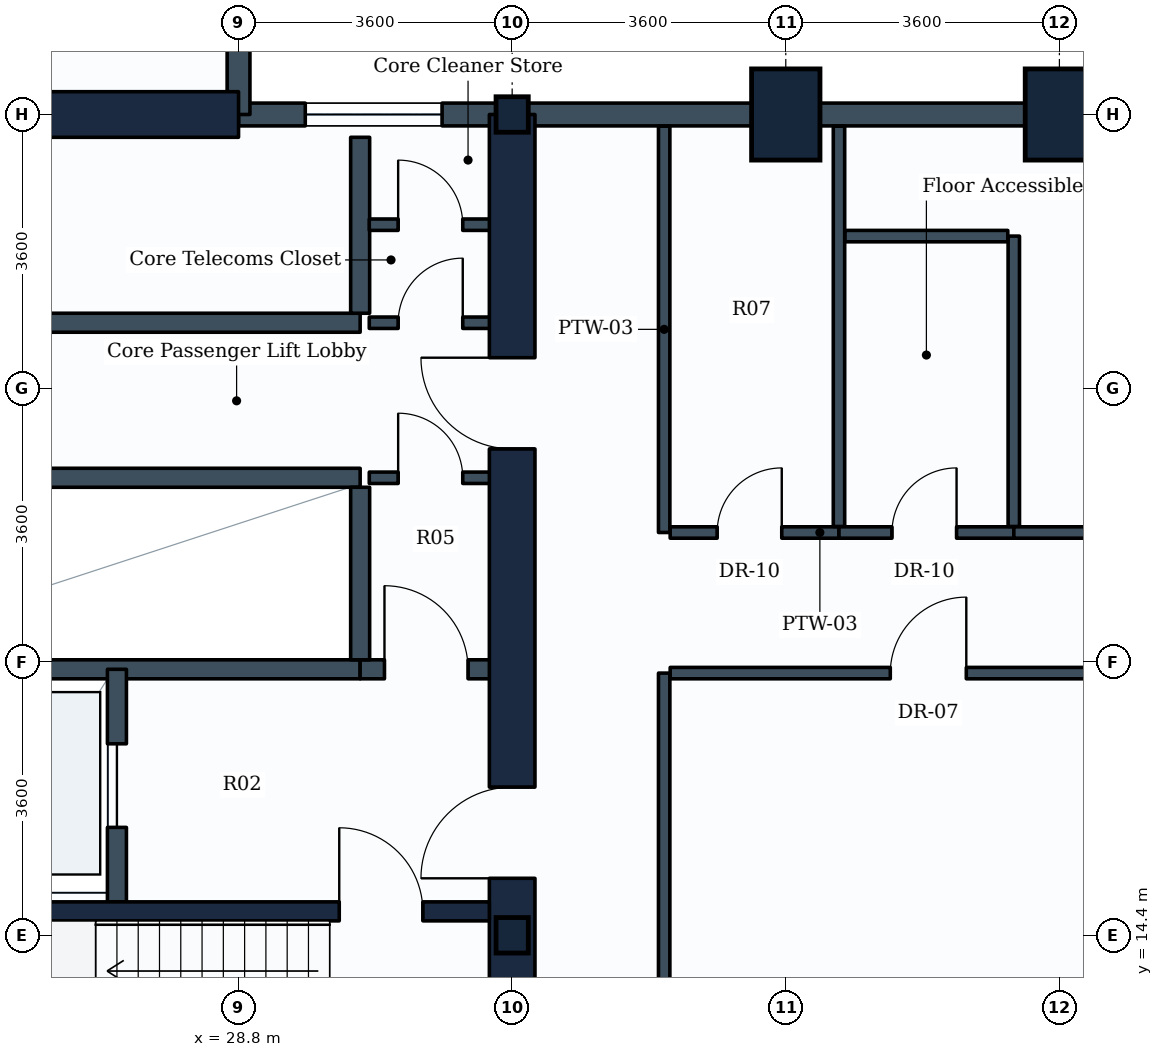
"""IFC4 building model, lengths in metres.
Left out: names, types, materials, properties, quantities, classifications, styles, units other than length and angle.
Written with IfcOpenShell. Run it as: python <this file> out.ifc"""

import sys

from ifc_helpers import new_model, si_unit, direction, frame, frame_2d, origin, origin_2d, place, context, subcontext, project, spatial, rectangle, i_section, extrude, element, fill, save


model = new_model("IFC4")
c1 = context("Model", 3, precision=1e-05, world=origin(), true_north=direction((0.0, 1.0)))
c2 = subcontext(c1, "Body", "Model", "MODEL_VIEW")
j1 = project(units=[si_unit("LENGTHUNIT", "METRE"), si_unit("PLANEANGLEUNIT", "RADIAN")], contexts=[c1])
p1 = place(None, origin())
s1 = spatial("IfcSite", under=j1, at=p1, CompositionType="ELEMENT")
p2 = place(p1, origin())
s2 = spatial("IfcBuilding", under=s1, at=p2, CompositionType="ELEMENT")
p3 = place(p2, frame((0.0, 0.0, 55.2)))
s3 = spatial("IfcBuildingStorey", under=s2, at=p3, CompositionType="ELEMENT", Elevation=55.2)
for number, where, z_axis, x_axis in (
    (1, (32.4, 14.4, 0.0), (0.0, 0.0, 1.0), (1.0, 0.0, 0.0)),
    (2, (32.4, 25.2, 0.0), (0.0, 0.0, 1.0), (1.0, 0.0, 0.0)),
):
    element("IfcColumn", number, at=place(p3, frame(where, z_axis=z_axis, x_axis=x_axis)), inside=s3, PredefinedType="COLUMN", context=c2, shape_type="SweptSolid", body=[
        extrude(i_section(OverallWidth=0.424, OverallDepth=0.467, WebThickness=0.033, FlangeThickness=0.053, FilletRadius=0.015, at=origin_2d()), origin(), (0.0, 0.0, 1.0), 3.9),
    ])
for number, where, z_axis, x_axis in (
    (3, (36.0, 25.2, 0.0), (0.0, 0.0, 1.0), (1.0, 0.0, 0.0)),
    (4, (39.6, 25.2, 0.0), (0.0, 0.0, 1.0), (1.0, 0.0, 0.0)),
):
    element("IfcColumn", number, at=place(p3, frame(where, z_axis=z_axis, x_axis=x_axis)), inside=s3, PredefinedType="COLUMN", context=c2, shape_type="SweptSolid", body=[
        extrude(rectangle(XDim=0.9, YDim=1.2, at=origin_2d()), origin(), (0.0, 0.0, 1.0), 3.9),
    ])
p4 = place(p3, frame((39.6, 25.2, 0.0), z_axis=(0.0, 0.0, 1.0), x_axis=(1.0, 0.0, 0.0)))
e5 = element("IfcWall", 5, at=p4, inside=s3, PredefinedType="STANDARD", context=c2, shape_type="SweptSolid", body=[
    extrude(rectangle(XDim=3.6, YDim=0.3, at=frame_2d((1.8, 0.0))), origin(), (0.0, 0.0, 1.0), 2.93),
])
p5 = place(p4, frame((0.9, 0.0, 0.85)))
e6 = element("IfcOpeningElement", 6, at=p5, cuts=e5, PredefinedType="OPENING", context=c2, shape_type="SweptSolid", body=[
    extrude(rectangle(XDim=1.8, YDim=1.35, at=frame_2d((0.9, 0.675))), frame((0.0, 0.16, 0.0), z_axis=(0.0, -1.0, 0.0), x_axis=(1.0, 0.0, 0.0)), (0.0, 0.0, 1.0), 0.32),
])
for number, where, z_axis, x_axis in (
    (7, (36.0, 25.2, 0.0), (0.0, 0.0, 1.0), (1.0, 0.0, 0.0)),
    (8, (32.4, 25.2, 0.0), (0.0, 0.0, 1.0), (1.0, 0.0, 0.0)),
):
    element("IfcWall", number, at=place(p3, frame(where, z_axis=z_axis, x_axis=x_axis)), inside=s3, PredefinedType="STANDARD", context=c2, shape_type="SweptSolid", body=[
        extrude(rectangle(XDim=3.6, YDim=0.3, at=frame_2d((1.8, 0.0))), origin(), (0.0, 0.0, 1.0), 2.93),
    ])
p6 = place(p3, frame((28.8, 25.2, 0.0), z_axis=(0.0, 0.0, 1.0), x_axis=(1.0, 0.0, 0.0)))
e9 = element("IfcWall", 9, at=p6, inside=s3, PredefinedType="STANDARD", context=c2, shape_type="SweptSolid", body=[
    extrude(rectangle(XDim=3.6, YDim=0.3, at=frame_2d((1.8, 0.0))), origin(), (0.0, 0.0, 1.0), 3.635),
])
p7 = place(p6, frame((0.878, 0.0, 0.85)))
e10 = element("IfcOpeningElement", 10, at=p7, cuts=e9, PredefinedType="OPENING", context=c2, shape_type="SweptSolid", body=[
    extrude(rectangle(XDim=1.8, YDim=1.35, at=frame_2d((0.9, 0.675))), frame((0.0, 0.16, 0.0), z_axis=(0.0, -1.0, 0.0), x_axis=(1.0, 0.0, 0.0)), (0.0, 0.0, 1.0), 0.32),
])
p8 = place(p3, frame((28.8, 25.2, 0.0), z_axis=(0.0, 0.0, 1.0), x_axis=(0.0, 1.0, 0.0)))
e11 = element("IfcWall", 11, at=p8, inside=s3, PredefinedType="STANDARD", context=c2, shape_type="SweptSolid", body=[
    extrude(rectangle(XDim=3.6, YDim=0.3, at=frame_2d((1.8, 0.0))), origin(), (0.0, 0.0, 1.0), 3.14),
])
p9 = place(p3, frame((14.4, 25.2, 0.0), z_axis=(0.0, 0.0, 1.0), x_axis=(1.0, 0.0, 0.0)))
e12 = element("IfcWall", 12, at=p9, inside=s3, PredefinedType="SHEAR", context=c2, shape_type="SweptSolid", body=[
    extrude(rectangle(XDim=14.4, YDim=0.6, at=frame_2d((7.2, 0.0))), origin(), (0.0, 0.0, 1.0), 3.65),
])
p10 = place(p3, frame((32.4, 10.8, 0.0), z_axis=(0.0, 0.0, 1.0), x_axis=(0.0, 1.0, 0.0)))
e13 = element("IfcWall", 13, at=p10, inside=s3, PredefinedType="SHEAR", context=c2, shape_type="SweptSolid", body=[
    extrude(rectangle(XDim=14.4, YDim=0.6, at=frame_2d((7.2, 0.0))), origin(), (0.0, 0.0, 1.0), 3.65),
])
p11 = place(p10, frame((4.35, 0.0, 0.0)))
e14 = element("IfcOpeningElement", 14, at=p11, cuts=e13, PredefinedType="OPENING", context=c2, shape_type="SweptSolid", body=[
    extrude(rectangle(XDim=1.2, YDim=2.1, at=frame_2d((0.6, 1.05))), frame((0.0, 0.31, 0.0), z_axis=(0.0, -1.0, 0.0), x_axis=(1.0, 0.0, 0.0)), (0.0, 0.0, 1.0), 0.62),
])
p12 = place(p10, frame((10.0, 0.0, 0.0)))
e15 = element("IfcOpeningElement", 15, at=p12, cuts=e13, PredefinedType="OPENING", context=c2, shape_type="SweptSolid", body=[
    extrude(rectangle(XDim=1.2, YDim=2.1, at=frame_2d((0.6, 1.05))), frame((0.0, 0.31, 0.0), z_axis=(0.0, -1.0, 0.0), x_axis=(1.0, 0.0, 0.0)), (0.0, 0.0, 1.0), 0.62),
])
p13 = place(p3, frame((23.35, 14.715, 0.0), z_axis=(0.0, 0.0, 1.0), x_axis=(1.0, 0.0, 0.0)))
e16 = element("IfcWall", 16, at=p13, inside=s3, PredefinedType="SHEAR", context=c2, shape_type="SweptSolid", body=[
    extrude(rectangle(XDim=8.75, YDim=0.25, at=frame_2d((4.375, 0.0))), origin(), (0.0, 0.0, 1.0), 3.65),
])
p14 = place(p13, frame((6.775, 0.0, 0.0)))
e17 = element("IfcOpeningElement", 17, at=p14, cuts=e16, PredefinedType="OPENING", context=c2, shape_type="SweptSolid", body=[
    extrude(rectangle(XDim=1.1, YDim=2.1, at=frame_2d((0.55, 1.05))), frame((0.0, 0.135, 0.0), z_axis=(0.0, -1.0, 0.0), x_axis=(1.0, 0.0, 0.0)), (0.0, 0.0, 1.0), 0.27),
])
p15 = place(p3, frame((21.88, 17.9, 0.0), z_axis=(0.0, 0.0, 1.0), x_axis=(1.0, 0.0, 0.0)))
e18 = element("IfcWall", 18, at=p15, inside=s3, PredefinedType="PARTITIONING", context=c2, shape_type="SweptSolid", body=[
    extrude(rectangle(XDim=8.52, YDim=0.25, at=frame_2d((4.26, 0.0))), origin(), (0.0, 0.0, 1.0), 3.635),
])
p16 = place(p3, frame((30.4, 17.9, 0.0), z_axis=(0.0, 0.0, 1.0), x_axis=(1.0, 0.0, 0.0)))
e19 = element("IfcWall", 19, at=p16, inside=s3, PredefinedType="PARTITIONING", context=c2, shape_type="SweptSolid", body=[
    extrude(rectangle(XDim=1.75, YDim=0.25, at=frame_2d((0.875, 0.0))), origin(), (0.0, 0.0, 1.0), 3.635),
])
p17 = place(p16, frame((0.32, 0.0, 0.0)))
e20 = element("IfcOpeningElement", 20, at=p17, cuts=e19, PredefinedType="OPENING", context=c2, shape_type="SweptSolid", body=[
    extrude(rectangle(XDim=1.1, YDim=2.1, at=frame_2d((0.55, 1.05))), frame((0.0, 0.135, 0.0), z_axis=(0.0, -1.0, 0.0), x_axis=(1.0, 0.0, 0.0)), (0.0, 0.0, 1.0), 0.27),
])
p18 = place(p3, frame((27.2, 14.84, 0.0), z_axis=(0.0, 0.0, 1.0), x_axis=(0.0, 1.0, 0.0)))
e21 = element("IfcWall", 21, at=p18, inside=s3, PredefinedType="PARTITIONING", context=c2, shape_type="SweptSolid", body=[
    extrude(rectangle(XDim=3.06, YDim=0.25, at=frame_2d((1.53, 0.0))), origin(), (0.0, 0.0, 1.0), 3.635),
])
p19 = place(p18, frame((0.98, 0.0, 0.0)))
e22 = element("IfcOpeningElement", 22, at=p19, cuts=e21, PredefinedType="OPENING", context=c2, shape_type="SweptSolid", body=[
    extrude(rectangle(XDim=1.1, YDim=2.1, at=frame_2d((0.55, 1.05))), frame((0.0, 0.135, 0.0), z_axis=(0.0, -1.0, 0.0), x_axis=(1.0, 0.0, 0.0)), (0.0, 0.0, 1.0), 0.27),
])
p20 = place(p3, frame((23.18, 20.42, 0.0), z_axis=(0.0, 0.0, 1.0), x_axis=(1.0, 0.0, 0.0)))
e23 = element("IfcWall", 23, at=p20, inside=s3, PredefinedType="PARTITIONING", context=c2, shape_type="SweptSolid", body=[
    extrude(rectangle(XDim=7.22, YDim=0.25, at=frame_2d((3.61, 0.0))), origin(), (0.0, 0.0, 1.0), 3.635),
])
p21 = place(p3, frame((30.4, 18.025, 0.0), z_axis=(0.0, 0.0, 1.0), x_axis=(0.0, 1.0, 0.0)))
e24 = element("IfcWall", 24, at=p21, inside=s3, PredefinedType="PARTITIONING", context=c2, shape_type="SweptSolid", body=[
    extrude(rectangle(XDim=2.27, YDim=0.25, at=frame_2d((1.135, 0.0))), origin(), (0.0, 0.0, 1.0), 3.635),
])
p22 = place(p3, frame((23.18, 22.46, 0.0), z_axis=(0.0, 0.0, 1.0), x_axis=(1.0, 0.0, 0.0)))
e25 = element("IfcWall", 25, at=p22, inside=s3, PredefinedType="PARTITIONING", context=c2, shape_type="SweptSolid", body=[
    extrude(rectangle(XDim=7.22, YDim=0.25, at=frame_2d((3.61, 0.0))), origin(), (0.0, 0.0, 1.0), 3.635),
])
p23 = place(p3, frame((30.4, 22.585, 0.0), z_axis=(0.0, 0.0, 1.0), x_axis=(0.0, 1.0, 0.0)))
e26 = element("IfcWall", 26, at=p23, inside=s3, PredefinedType="PARTITIONING", context=c2, shape_type="SweptSolid", body=[
    extrude(rectangle(XDim=2.315, YDim=0.25, at=frame_2d((1.157, 0.0))), origin(), (0.0, 0.0, 1.0), 3.635),
])
p24 = place(p3, frame((30.52, 22.46, 0.0), z_axis=(0.0, 0.0, 1.0), x_axis=(1.0, 0.0, 0.0)))
e27 = element("IfcWall", 27, at=p24, inside=s3, PredefinedType="PARTITIONING", context=c2, shape_type="SweptSolid", body=[
    extrude(rectangle(XDim=1.63, YDim=0.15, at=frame_2d((0.815, 0.0))), origin(), (0.0, 0.0, 1.0), 3.635),
])
p25 = place(p24, frame((0.38, 0.0, 0.0)))
e28 = element("IfcOpeningElement", 28, at=p25, cuts=e27, PredefinedType="OPENING", context=c2, shape_type="SweptSolid", body=[
    extrude(rectangle(XDim=0.85, YDim=2.1, at=frame_2d((0.425, 1.05))), frame((0.0, 0.085, 0.0), z_axis=(0.0, -1.0, 0.0), x_axis=(1.0, 0.0, 0.0)), (0.0, 0.0, 1.0), 0.17),
])
p26 = place(p3, frame((30.52, 23.75, 0.0), z_axis=(0.0, 0.0, 1.0), x_axis=(1.0, 0.0, 0.0)))
e29 = element("IfcWall", 29, at=p26, inside=s3, PredefinedType="PARTITIONING", context=c2, shape_type="SweptSolid", body=[
    extrude(rectangle(XDim=1.63, YDim=0.15, at=frame_2d((0.815, 0.0))), origin(), (0.0, 0.0, 1.0), 3.635),
])
p27 = place(p26, frame((0.38, 0.0, 0.0)))
e30 = element("IfcOpeningElement", 30, at=p27, cuts=e29, PredefinedType="OPENING", context=c2, shape_type="SweptSolid", body=[
    extrude(rectangle(XDim=0.85, YDim=2.1, at=frame_2d((0.425, 1.05))), frame((0.0, 0.085, 0.0), z_axis=(0.0, -1.0, 0.0), x_axis=(1.0, 0.0, 0.0)), (0.0, 0.0, 1.0), 0.17),
])
p28 = place(p3, frame((30.52, 20.42, 0.0), z_axis=(0.0, 0.0, 1.0), x_axis=(1.0, 0.0, 0.0)))
e31 = element("IfcWall", 31, at=p28, inside=s3, PredefinedType="PARTITIONING", context=c2, shape_type="SweptSolid", body=[
    extrude(rectangle(XDim=1.63, YDim=0.15, at=frame_2d((0.815, 0.0))), origin(), (0.0, 0.0, 1.0), 3.635),
])
p29 = place(p28, frame((0.38, 0.0, 0.0)))
e32 = element("IfcOpeningElement", 32, at=p29, cuts=e31, PredefinedType="OPENING", context=c2, shape_type="SweptSolid", body=[
    extrude(rectangle(XDim=0.85, YDim=2.1, at=frame_2d((0.425, 1.05))), frame((0.0, 0.085, 0.0), z_axis=(0.0, -1.0, 0.0), x_axis=(1.0, 0.0, 0.0)), (0.0, 0.0, 1.0), 0.17),
])
p30 = place(p3, frame((34.4, 19.7, 0.0), z_axis=(0.0, 0.0, 1.0), x_axis=(0.0, 1.0, 0.0)))
e33 = element("IfcWall", 33, at=p30, inside=s3, PredefinedType="PARTITIONING", context=c2, shape_type="SweptSolid", body=[
    extrude(rectangle(XDim=5.346, YDim=0.15, at=frame_2d((2.673, 0.0))), origin(), (0.0, 0.0, 1.0), 2.93),
])
p31 = place(p3, frame((34.479, 19.7, 0.0), z_axis=(0.0, 0.0, 1.0), x_axis=(1.0, 0.0, 0.0)))
e34 = element("IfcWall", 34, at=p31, inside=s3, PredefinedType="PARTITIONING", context=c2, shape_type="SweptSolid", body=[
    extrude(rectangle(XDim=2.221, YDim=0.15, at=frame_2d((1.11, 0.0))), origin(), (0.0, 0.0, 1.0), 3.08),
])
p32 = place(p31, frame((0.618, 0.0, 0.0)))
e35 = element("IfcOpeningElement", 35, at=p32, cuts=e34, PredefinedType="OPENING", context=c2, shape_type="SweptSolid", body=[
    extrude(rectangle(XDim=0.85, YDim=2.1, at=frame_2d((0.425, 1.05))), frame((0.0, 0.085, 0.0), z_axis=(0.0, -1.0, 0.0), x_axis=(1.0, 0.0, 0.0)), (0.0, 0.0, 1.0), 0.17),
])
p33 = place(p3, frame((36.7, 19.779, 0.0), z_axis=(0.0, 0.0, 1.0), x_axis=(0.0, 1.0, 0.0)))
e36 = element("IfcWall", 36, at=p33, inside=s3, PredefinedType="PARTITIONING", context=c2, shape_type="SweptSolid", body=[
    extrude(rectangle(XDim=5.267, YDim=0.15, at=frame_2d((2.633, 0.0))), origin(), (0.0, 0.0, 1.0), 2.93),
])
p34 = place(p3, frame((36.7, 19.7, 0.0), z_axis=(0.0, 0.0, 1.0), x_axis=(1.0, 0.0, 0.0)))
e37 = element("IfcWall", 37, at=p34, inside=s3, PredefinedType="PARTITIONING", context=c2, shape_type="SweptSolid", body=[
    extrude(rectangle(XDim=2.3, YDim=0.15, at=frame_2d((1.15, 0.0))), origin(), (0.0, 0.0, 1.0), 3.635),
])
p35 = place(p34, frame((0.697, 0.0, 0.0)))
e38 = element("IfcOpeningElement", 38, at=p35, cuts=e37, PredefinedType="OPENING", context=c2, shape_type="SweptSolid", body=[
    extrude(rectangle(XDim=0.85, YDim=2.1, at=frame_2d((0.425, 1.05))), frame((0.0, 0.085, 0.0), z_axis=(0.0, -1.0, 0.0), x_axis=(1.0, 0.0, 0.0)), (0.0, 0.0, 1.0), 0.17),
])
p36 = place(p3, frame((39.0, 19.779, 0.0), z_axis=(0.0, 0.0, 1.0), x_axis=(0.0, 1.0, 0.0)))
e39 = element("IfcWall", 39, at=p36, inside=s3, PredefinedType="PARTITIONING", context=c2, shape_type="SweptSolid", body=[
    extrude(rectangle(XDim=3.821, YDim=0.15, at=frame_2d((1.911, 0.0))), origin(), (0.0, 0.0, 1.0), 3.03),
])
p37 = place(p3, frame((36.779, 23.6, 0.0), z_axis=(0.0, 0.0, 1.0), x_axis=(1.0, 0.0, 0.0)))
e40 = element("IfcWall", 40, at=p37, inside=s3, PredefinedType="PARTITIONING", context=c2, shape_type="SweptSolid", body=[
    extrude(rectangle(XDim=2.142, YDim=0.15, at=frame_2d((1.071, 0.0))), origin(), (0.0, 0.0, 1.0), 3.635),
])
p38 = place(p3, frame((34.4, 3.754, 0.0), z_axis=(0.0, 0.0, 1.0), x_axis=(0.0, 1.0, 0.0)))
e41 = element("IfcWall", 41, at=p38, inside=s3, PredefinedType="PARTITIONING", context=c2, shape_type="SweptSolid", body=[
    extrude(rectangle(XDim=14.096, YDim=0.15, at=frame_2d((7.048, 0.0))), origin(), (0.0, 0.0, 1.0), 2.93),
])
p39 = place(p3, frame((34.479, 17.85, 0.0), z_axis=(0.0, 0.0, 1.0), x_axis=(1.0, 0.0, 0.0)))
e42 = element("IfcWall", 42, at=p39, inside=s3, PredefinedType="PARTITIONING", context=c2, shape_type="SweptSolid", body=[
    extrude(rectangle(XDim=6.792, YDim=0.15, at=frame_2d((3.396, 0.0))), origin(), (0.0, 0.0, 1.0), 3.04),
])
p40 = place(p39, frame((2.896, 0.0, 0.0)))
e43 = element("IfcOpeningElement", 43, at=p40, cuts=e42, PredefinedType="OPENING", context=c2, shape_type="SweptSolid", body=[
    extrude(rectangle(XDim=1.0, YDim=2.1, at=frame_2d((0.5, 1.05))), frame((0.0, 0.085, 0.0), z_axis=(0.0, -1.0, 0.0), x_axis=(1.0, 0.0, 0.0)), (0.0, 0.0, 1.0), 0.17),
])
p41 = place(p3, frame((39.0, 19.7, 0.0), z_axis=(0.0, 0.0, 1.0), x_axis=(1.0, 0.0, 0.0)))
e44 = element("IfcWall", 44, at=p41, inside=s3, PredefinedType="PARTITIONING", context=c2, shape_type="SweptSolid", body=[
    extrude(rectangle(XDim=8.321, YDim=0.15, at=frame_2d((4.161, 0.0))), origin(), (0.0, 0.0, 1.0), 3.04),
])
p42 = place(p41, frame((3.7, 0.0, 0.0)))
e45 = element("IfcOpeningElement", 45, at=p42, cuts=e44, PredefinedType="OPENING", context=c2, shape_type="SweptSolid", body=[
    extrude(rectangle(XDim=1.0, YDim=2.1, at=frame_2d((0.5, 1.05))), frame((0.0, 0.085, 0.0), z_axis=(0.0, -1.0, 0.0), x_axis=(1.0, 0.0, 0.0)), (0.0, 0.0, 1.0), 0.17),
])
p43 = place(p7, origin())
e46 = element("IfcWindow", 46, at=p43, inside=s3, PartitioningType="SINGLE_PANEL", PredefinedType="WINDOW", context=c2, shape_type="SweptSolid", body=[
    extrude(rectangle(XDim=1.8, YDim=1.35, at=frame_2d((0.9, 0.675))), frame((0.0, 0.03, 0.0), z_axis=(0.0, -1.0, 0.0), x_axis=(1.0, 0.0, 0.0)), (0.0, 0.0, 1.0), 0.06),
])
fill(e10, e46)
p44 = place(p14, origin())
e47 = element("IfcDoor", 47, at=p44, inside=s3, OperationType="SINGLE_SWING_LEFT", PredefinedType="DOOR", context=c2, shape_type="SweptSolid", body=[
    extrude(rectangle(XDim=1.1, YDim=2.1, at=frame_2d((0.55, 1.05))), frame((0.0, 0.025, 0.0), z_axis=(0.0, -1.0, 0.0), x_axis=(1.0, 0.0, 0.0)), (0.0, 0.0, 1.0), 0.05),
])
fill(e17, e47)
p45 = place(p19, origin())
e48 = element("IfcDoor", 48, at=p45, inside=s3, OperationType="SLIDING_TO_LEFT", PredefinedType="DOOR", context=c2, shape_type="SweptSolid", body=[
    extrude(rectangle(XDim=1.1, YDim=2.1, at=frame_2d((0.55, 1.05))), frame((0.0, 0.025, 0.0), z_axis=(0.0, -1.0, 0.0), x_axis=(1.0, 0.0, 0.0)), (0.0, 0.0, 1.0), 0.05),
])
fill(e22, e48)
p46 = place(p11, origin())
e49 = element("IfcDoor", 49, at=p46, inside=s3, OperationType="SINGLE_SWING_LEFT", PredefinedType="DOOR", context=c2, shape_type="SweptSolid", body=[
    extrude(rectangle(XDim=1.2, YDim=2.1, at=frame_2d((0.6, 1.05))), frame((0.0, 0.025, 0.0), z_axis=(0.0, -1.0, 0.0), x_axis=(1.0, 0.0, 0.0)), (0.0, 0.0, 1.0), 0.05),
])
fill(e14, e49)
p47 = place(p17, origin())
e50 = element("IfcDoor", 50, at=p47, inside=s3, OperationType="SINGLE_SWING_LEFT", PredefinedType="DOOR", context=c2, shape_type="SweptSolid", body=[
    extrude(rectangle(XDim=1.1, YDim=2.1, at=frame_2d((0.55, 1.05))), frame((0.0, 0.025, 0.0), z_axis=(0.0, -1.0, 0.0), x_axis=(1.0, 0.0, 0.0)), (0.0, 0.0, 1.0), 0.05),
])
fill(e20, e50)
p48 = place(p12, origin())
e51 = element("IfcDoor", 51, at=p48, inside=s3, OperationType="SINGLE_SWING_RIGHT", PredefinedType="DOOR", context=c2, shape_type="SweptSolid", body=[
    extrude(rectangle(XDim=1.2, YDim=2.1, at=frame_2d((0.6, 1.05))), frame((0.0, 0.025, 0.0), z_axis=(0.0, -1.0, 0.0), x_axis=(1.0, 0.0, 0.0)), (0.0, 0.0, 1.0), 0.05),
])
fill(e15, e51)
p49 = place(p25, origin())
e52 = element("IfcDoor", 52, at=p49, inside=s3, OperationType="SINGLE_SWING_RIGHT", PredefinedType="DOOR", context=c2, shape_type="SweptSolid", body=[
    extrude(rectangle(XDim=0.85, YDim=2.1, at=frame_2d((0.425, 1.05))), frame((0.0, 0.025, 0.0), z_axis=(0.0, -1.0, 0.0), x_axis=(1.0, 0.0, 0.0)), (0.0, 0.0, 1.0), 0.05),
])
fill(e28, e52)
p50 = place(p27, origin())
e53 = element("IfcDoor", 53, at=p50, inside=s3, OperationType="SINGLE_SWING_LEFT", PredefinedType="DOOR", context=c2, shape_type="SweptSolid", body=[
    extrude(rectangle(XDim=0.85, YDim=2.1, at=frame_2d((0.425, 1.05))), frame((0.0, 0.025, 0.0), z_axis=(0.0, -1.0, 0.0), x_axis=(1.0, 0.0, 0.0)), (0.0, 0.0, 1.0), 0.05),
])
fill(e30, e53)
p51 = place(p29, origin())
e54 = element("IfcDoor", 54, at=p51, inside=s3, OperationType="SINGLE_SWING_LEFT", PredefinedType="DOOR", context=c2, shape_type="SweptSolid", body=[
    extrude(rectangle(XDim=0.85, YDim=2.1, at=frame_2d((0.425, 1.05))), frame((0.0, 0.025, 0.0), z_axis=(0.0, -1.0, 0.0), x_axis=(1.0, 0.0, 0.0)), (0.0, 0.0, 1.0), 0.05),
])
fill(e32, e54)
p52 = place(p32, origin())
e55 = element("IfcDoor", 55, at=p52, inside=s3, OperationType="SINGLE_SWING_RIGHT", PredefinedType="DOOR", context=c2, shape_type="SweptSolid", body=[
    extrude(rectangle(XDim=0.85, YDim=2.1, at=frame_2d((0.425, 1.05))), frame((0.0, 0.025, 0.0), z_axis=(0.0, -1.0, 0.0), x_axis=(1.0, 0.0, 0.0)), (0.0, 0.0, 1.0), 0.05),
])
fill(e35, e55)
p53 = place(p35, origin())
e56 = element("IfcDoor", 56, at=p53, inside=s3, OperationType="SINGLE_SWING_RIGHT", PredefinedType="DOOR", context=c2, shape_type="SweptSolid", body=[
    extrude(rectangle(XDim=0.85, YDim=2.1, at=frame_2d((0.425, 1.05))), frame((0.0, 0.025, 0.0), z_axis=(0.0, -1.0, 0.0), x_axis=(1.0, 0.0, 0.0)), (0.0, 0.0, 1.0), 0.05),
])
fill(e38, e56)
p54 = place(p40, origin())
e57 = element("IfcDoor", 57, at=p54, inside=s3, OperationType="SINGLE_SWING_RIGHT", PredefinedType="DOOR", context=c2, shape_type="SweptSolid", body=[
    extrude(rectangle(XDim=1.0, YDim=2.1, at=frame_2d((0.5, 1.05))), frame((0.0, 0.025, 0.0), z_axis=(0.0, -1.0, 0.0), x_axis=(1.0, 0.0, 0.0)), (0.0, 0.0, 1.0), 0.05),
])
fill(e43, e57)
save(model, sys.argv[1])
